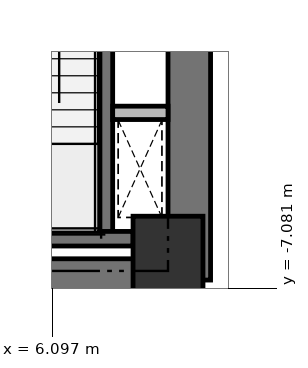
"""IFC4 building model, lengths in metres.
Left out: names, types, materials, properties, quantities, classifications, styles, units other than length and angle.
Written with IfcOpenShell. Run it as: python <this file> out.ifc"""

import sys

from ifc_helpers import new_model, si_unit, direction, frame, frame_2d, origin, origin_2d, place, context, subcontext, project, spatial, rectangle, extrude, element, save


model = new_model("IFC4")
c1 = context("Model", 3, precision=1e-05, world=origin(), true_north=direction((0.0, 1.0)))
c2 = subcontext(c1, "Body", "Model", "MODEL_VIEW")
j1 = project(units=[si_unit("LENGTHUNIT", "METRE"), si_unit("PLANEANGLEUNIT", "RADIAN")], contexts=[c1])
p1 = place(None, origin())
s1 = spatial("IfcSite", under=j1, at=p1, CompositionType="ELEMENT")
p2 = place(p1, origin())
s2 = spatial("IfcBuilding", under=s1, at=p2, CompositionType="ELEMENT")
p3 = place(p2, origin())
s3 = spatial("IfcBuildingStorey", under=s2, at=p3, CompositionType="ELEMENT", Elevation=0.0)
p4 = place(p3, frame((8.0, -6.6, 0.0), z_axis=(0.0, 0.0, 1.0), x_axis=(1.0, 0.0, 0.0)))
e1 = element("IfcColumn", 1, at=p4, inside=s3, PredefinedType="COLUMN", context=c2, shape_type="SweptSolid", body=[
    extrude(rectangle(XDim=1.15, YDim=1.4, at=origin_2d()), origin(), (0.0, 0.0, 1.0), 6.0),
])
p5 = place(p3, frame((4.4, -6.95, 0.0), z_axis=(0.0, 0.0, 1.0), x_axis=(1.0, 0.0, 0.0)))
e2 = element("IfcWall", 2, at=p5, inside=s3, PredefinedType="SHEAR", context=c2, shape_type="SweptSolid", body=[
    extrude(rectangle(XDim=3.95, YDim=0.7, at=frame_2d((1.975, 0.0))), origin(), (0.0, 0.0, 1.0), 5.72),
])
p6 = place(p3, frame((8.35, -6.95, 0.0), z_axis=(0.0, 0.0, 1.0), x_axis=(0.0, 1.0, 0.0)))
e3 = element("IfcWall", 3, at=p6, inside=s3, PredefinedType="SHEAR", context=c2, shape_type="SweptSolid", body=[
    extrude(rectangle(XDim=8.1, YDim=0.7, at=frame_2d((4.05, 0.0))), origin(), (0.0, 0.0, 1.0), 5.72),
])
p7 = place(p3, frame((6.97, -6.16, 0.0), z_axis=(0.0, 0.0, 1.0), x_axis=(0.0, 1.0, 0.0)))
e4 = element("IfcWall", 4, at=p7, inside=s3, PredefinedType="SHEAR", context=c2, shape_type="SweptSolid", body=[
    extrude(rectangle(XDim=7.22, YDim=0.24, at=frame_2d((3.61, 0.0))), origin(), (0.0, 0.0, 1.0), 5.72),
])
p8 = place(p3, frame((4.01, -6.27, 0.0), z_axis=(0.0, 0.0, 1.0), x_axis=(1.0, 0.0, 0.0)))
e5 = element("IfcWall", 5, at=p8, inside=s3, PredefinedType="SHEAR", context=c2, shape_type="SweptSolid", body=[
    extrude(rectangle(XDim=3.415, YDim=0.24, at=frame_2d((1.708, 0.0))), origin(), (0.0, 0.0, 1.0), 5.72),
])
p9 = place(p3, frame((7.09, -4.2, 0.0), z_axis=(0.0, 0.0, 1.0), x_axis=(1.0, 0.0, 0.0)))
e6 = element("IfcWall", 6, at=p9, inside=s3, PredefinedType="PARTITIONING", context=c2, shape_type="SweptSolid", body=[
    extrude(rectangle(XDim=0.91, YDim=0.22, at=frame_2d((0.455, 0.0))), origin(), (0.0, 0.0, 1.0), 5.72),
])
save(model, sys.argv[1])
